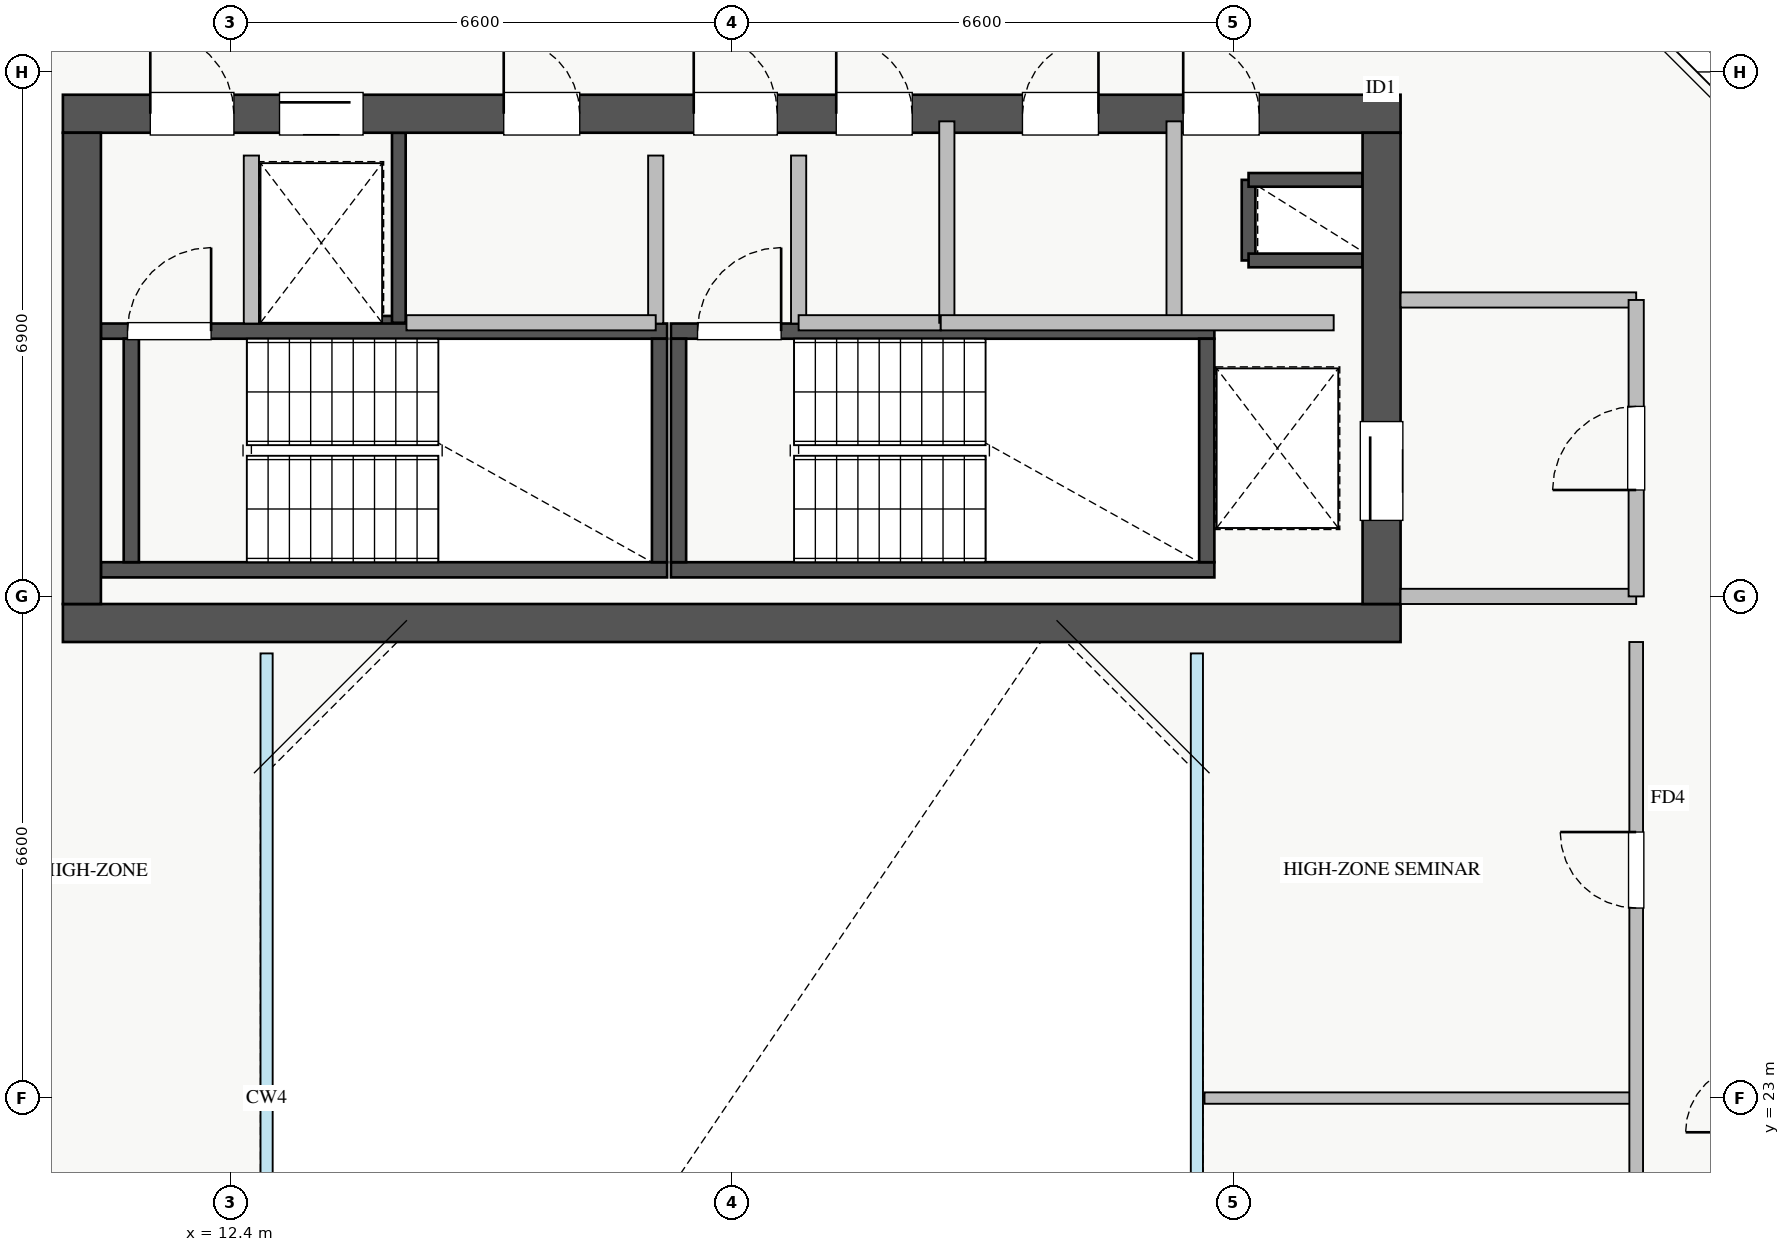
"""IFC4 building model, lengths in metres.
Left out: names, types, materials, properties, quantities, classifications, styles, units other than length and angle.
Written with IfcOpenShell. Run it as: python <this file> out.ifc"""

import sys

from ifc_helpers import new_model, si_unit, direction, frame, frame_2d, origin, place, context, subcontext, project, spatial, rectangle, extrude, source, transform, mapped, element, fill, save


model = new_model("IFC4")
c1 = context("Model", 3, precision=1e-05, world=origin(), true_north=direction((0.0, 1.0)))
c2 = subcontext(c1, "Body", "Model", "MODEL_VIEW")
j1 = project(units=[si_unit("LENGTHUNIT", "METRE"), si_unit("PLANEANGLEUNIT", "RADIAN")], contexts=[c1])
p1 = place(None, origin())
s1 = spatial("IfcSite", under=j1, at=p1, CompositionType="ELEMENT")
p2 = place(p1, origin())
s2 = spatial("IfcBuilding", under=s1, at=p2, CompositionType="ELEMENT")
p3 = place(p2, frame((0.0, 0.0, 226.25)))
s3 = spatial("IfcBuildingStorey", under=s2, at=p3, CompositionType="ELEMENT", Elevation=226.25)
p4 = place(p3, frame((12.68, 33.2, 0.0), z_axis=(0.0, 0.0, 1.0), x_axis=(1.0, 0.0, 0.0)))
e1 = element("IfcWall", 1, at=p4, inside=s3, PredefinedType="SHEAR", context=c2, shape_type="SweptSolid", body=[
    extrude(rectangle(XDim=1.94, YDim=0.18, at=frame_2d((0.97, 0.0))), origin(), (0.0, 0.0, 1.0), 3.07),
])
p5 = place(p3, frame((14.62, 33.2, 0.0), z_axis=(0.0, 0.0, 1.0), x_axis=(0.0, 1.0, 0.0)))
e2 = element("IfcWall", 2, at=p5, inside=s3, PredefinedType="SHEAR", context=c2, shape_type="SweptSolid", body=[
    extrude(rectangle(XDim=2.5, YDim=0.18, at=frame_2d((1.25, 0.0))), origin(), (0.0, 0.0, 1.0), 3.07),
])
p6 = place(p3, frame((25.8, 34.02, 0.0), z_axis=(0.0, 0.0, 1.0), x_axis=(0.0, 1.0, 0.0)))
e3 = element("IfcWall", 3, at=p6, inside=s3, PredefinedType="SHEAR", context=c2, shape_type="SweptSolid", body=[
    extrude(rectangle(XDim=1.06, YDim=0.18, at=frame_2d((0.53, 0.0))), origin(), (0.0, 0.0, 1.0), 3.07),
])
for number, where, z_axis, x_axis in (
    (4, (25.8, 35.08, 0.0), (0.0, 0.0, 1.0), (1.0, 0.0, 0.0)),
    (5, (25.8, 34.02, 0.0), (0.0, 0.0, 1.0), (1.0, 0.0, 0.0)),
):
    element("IfcWall", number, at=place(p3, frame(where, z_axis=z_axis, x_axis=x_axis)), inside=s3, PredefinedType="SHEAR", context=c2, shape_type="SweptSolid", body=[
        extrude(rectangle(XDim=1.5, YDim=0.18, at=frame_2d((0.75, 0.0))), origin(), (0.0, 0.0, 1.0), 3.07),
    ])
p7 = place(p3, frame((10.7, 29.95, 0.0), z_axis=(0.0, 0.0, 1.0), x_axis=(1.0, 0.0, 0.0)))
e6 = element("IfcWall", 6, at=p7, inside=s3, PredefinedType="SHEAR", context=c2, shape_type="SweptSolid", body=[
    extrude(rectangle(XDim=7.45, YDim=0.2, at=frame_2d((3.725, 0.0))), origin(), (0.0, 0.0, 1.0), 3.25),
])
p8 = place(p3, frame((10.7, 33.09, 0.0), z_axis=(0.0, 0.0, 1.0), x_axis=(1.0, 0.0, 0.0)))
e7 = element("IfcWall", 7, at=p8, inside=s3, PredefinedType="SHEAR", context=c2, shape_type="SweptSolid", body=[
    extrude(rectangle(XDim=7.45, YDim=0.2, at=frame_2d((3.725, 0.0))), origin(), (0.0, 0.0, 1.0), 3.25),
])
p9 = place(p8, frame((0.35, 0.0, 0.0)))
e8 = element("IfcOpeningElement", 8, at=p9, cuts=e7, PredefinedType="OPENING", context=c2, shape_type="SweptSolid", body=[
    extrude(rectangle(XDim=1.1, YDim=2.05, at=frame_2d((0.55, 1.025))), frame((0.0, 0.11, 0.0), z_axis=(0.0, -1.0, 0.0), x_axis=(1.0, 0.0, 0.0)), (0.0, 0.0, 1.0), 0.22),
])
for number, where, z_axis, x_axis in (
    (9, (11.1, 30.05, 0.0), (0.0, 0.0, 1.0), (0.0, 1.0, 0.0)),
    (10, (18.05, 30.05, 0.0), (0.0, 0.0, 1.0), (0.0, 1.0, 0.0)),
):
    element("IfcWall", number, at=place(p3, frame(where, z_axis=z_axis, x_axis=x_axis)), inside=s3, PredefinedType="SHEAR", context=c2, shape_type="SweptSolid", body=[
        extrude(rectangle(XDim=2.94, YDim=0.2, at=frame_2d((1.47, 0.0))), origin(), (0.0, 0.0, 1.0), 3.25),
    ])
p10 = place(p3, frame((18.2, 29.95, 0.0), z_axis=(0.0, 0.0, 1.0), x_axis=(1.0, 0.0, 0.0)))
e11 = element("IfcWall", 11, at=p10, inside=s3, PredefinedType="SHEAR", context=c2, shape_type="SweptSolid", body=[
    extrude(rectangle(XDim=7.15, YDim=0.2, at=frame_2d((3.575, 0.0))), origin(), (0.0, 0.0, 1.0), 3.25),
])
p11 = place(p3, frame((18.2, 33.09, 0.0), z_axis=(0.0, 0.0, 1.0), x_axis=(1.0, 0.0, 0.0)))
e12 = element("IfcWall", 12, at=p11, inside=s3, PredefinedType="SHEAR", context=c2, shape_type="SweptSolid", body=[
    extrude(rectangle(XDim=7.15, YDim=0.2, at=frame_2d((3.575, 0.0))), origin(), (0.0, 0.0, 1.0), 3.25),
])
p12 = place(p11, frame((0.35, 0.0, 0.0)))
e13 = element("IfcOpeningElement", 13, at=p12, cuts=e12, PredefinedType="OPENING", context=c2, shape_type="SweptSolid", body=[
    extrude(rectangle(XDim=1.1, YDim=2.05, at=frame_2d((0.55, 1.025))), frame((0.0, 0.11, 0.0), z_axis=(0.0, -1.0, 0.0), x_axis=(1.0, 0.0, 0.0)), (0.0, 0.0, 1.0), 0.22),
])
for number, where, z_axis, x_axis in (
    (14, (18.3, 30.05, 0.0), (0.0, 0.0, 1.0), (0.0, 1.0, 0.0)),
    (15, (25.25, 30.05, 0.0), (0.0, 0.0, 1.0), (0.0, 1.0, 0.0)),
):
    element("IfcWall", number, at=place(p3, frame(where, z_axis=z_axis, x_axis=x_axis)), inside=s3, PredefinedType="SHEAR", context=c2, shape_type="SweptSolid", body=[
        extrude(rectangle(XDim=2.94, YDim=0.2, at=frame_2d((1.47, 0.0))), origin(), (0.0, 0.0, 1.0), 3.25),
    ])
p13 = place(p3, frame((10.2, 29.25, 0.0), z_axis=(0.0, 0.0, 1.0), x_axis=(1.0, 0.0, 0.0)))
e16 = element("IfcWall", 16, at=p13, inside=s3, PredefinedType="SHEAR", context=c2, shape_type="SweptSolid", body=[
    extrude(rectangle(XDim=17.6, YDim=0.5, at=frame_2d((8.8, 0.0))), origin(), (0.0, 0.0, 1.0), 3.25),
])
p14 = place(p3, frame((10.2, 35.95, 0.0), z_axis=(0.0, 0.0, 1.0), x_axis=(1.0, 0.0, 0.0)))
e17 = element("IfcWall", 17, at=p14, inside=s3, PredefinedType="SHEAR", context=c2, shape_type="SweptSolid", body=[
    extrude(rectangle(XDim=17.6, YDim=0.5, at=frame_2d((8.8, 0.0))), origin(), (0.0, 0.0, 1.0), 3.25),
])
p15 = place(p14, frame((1.15, 0.0, 0.0)))
e18 = element("IfcOpeningElement", 18, at=p15, cuts=e17, PredefinedType="OPENING", context=c2, shape_type="SweptSolid", body=[
    extrude(rectangle(XDim=1.1, YDim=2.05, at=frame_2d((0.55, 1.025))), frame((0.0, 0.26, 0.0), z_axis=(0.0, -1.0, 0.0), x_axis=(1.0, 0.0, 0.0)), (0.0, 0.0, 1.0), 0.52),
])
p16 = place(p14, frame((8.3, 0.0, 0.0)))
e19 = element("IfcOpeningElement", 19, at=p16, cuts=e17, PredefinedType="OPENING", context=c2, shape_type="SweptSolid", body=[
    extrude(rectangle(XDim=1.1, YDim=2.05, at=frame_2d((0.55, 1.025))), frame((0.0, 0.26, 0.0), z_axis=(0.0, -1.0, 0.0), x_axis=(1.0, 0.0, 0.0)), (0.0, 0.0, 1.0), 0.52),
])
p17 = place(p14, frame((2.85, 0.0, 0.0)))
e20 = element("IfcOpeningElement", 20, at=p17, cuts=e17, PredefinedType="OPENING", context=c2, shape_type="SweptSolid", body=[
    extrude(rectangle(XDim=1.1, YDim=2.05, at=frame_2d((0.55, 1.025))), frame((0.0, 0.26, 0.0), z_axis=(0.0, -1.0, 0.0), x_axis=(1.0, 0.0, 0.0)), (0.0, 0.0, 1.0), 0.52),
])
p18 = place(p14, frame((5.8, 0.0, 0.0)))
e21 = element("IfcOpeningElement", 21, at=p18, cuts=e17, PredefinedType="OPENING", context=c2, shape_type="SweptSolid", body=[
    extrude(rectangle(XDim=1.0, YDim=2.05, at=frame_2d((0.5, 1.025))), frame((0.0, 0.26, 0.0), z_axis=(0.0, -1.0, 0.0), x_axis=(1.0, 0.0, 0.0)), (0.0, 0.0, 1.0), 0.52),
])
p19 = place(p14, frame((14.74, 0.0, 0.0)))
e22 = element("IfcOpeningElement", 22, at=p19, cuts=e17, PredefinedType="OPENING", context=c2, shape_type="SweptSolid", body=[
    extrude(rectangle(XDim=1.0, YDim=2.05, at=frame_2d((0.5, 1.025))), frame((0.0, 0.26, 0.0), z_axis=(0.0, -1.0, 0.0), x_axis=(1.0, 0.0, 0.0)), (0.0, 0.0, 1.0), 0.52),
])
p20 = place(p14, frame((10.175, 0.0, 0.0)))
e23 = element("IfcOpeningElement", 23, at=p20, cuts=e17, PredefinedType="OPENING", context=c2, shape_type="SweptSolid", body=[
    extrude(rectangle(XDim=1.0, YDim=2.05, at=frame_2d((0.5, 1.025))), frame((0.0, 0.26, 0.0), z_axis=(0.0, -1.0, 0.0), x_axis=(1.0, 0.0, 0.0)), (0.0, 0.0, 1.0), 0.52),
])
p21 = place(p14, frame((12.625, 0.0, 0.0)))
e24 = element("IfcOpeningElement", 24, at=p21, cuts=e17, PredefinedType="OPENING", context=c2, shape_type="SweptSolid", body=[
    extrude(rectangle(XDim=1.0, YDim=2.05, at=frame_2d((0.5, 1.025))), frame((0.0, 0.26, 0.0), z_axis=(0.0, -1.0, 0.0), x_axis=(1.0, 0.0, 0.0)), (0.0, 0.0, 1.0), 0.52),
])
p22 = place(p3, frame((10.45, 29.5, 0.0), z_axis=(0.0, 0.0, 1.0), x_axis=(0.0, 1.0, 0.0)))
e25 = element("IfcWall", 25, at=p22, inside=s3, PredefinedType="SHEAR", context=c2, shape_type="SweptSolid", body=[
    extrude(rectangle(XDim=6.2, YDim=0.5, at=frame_2d((3.1, 0.0))), origin(), (0.0, 0.0, 1.0), 3.25),
])
p23 = place(p3, frame((27.55, 29.5, 0.0), z_axis=(0.0, 0.0, 1.0), x_axis=(0.0, 1.0, 0.0)))
e26 = element("IfcWall", 26, at=p23, inside=s3, PredefinedType="SHEAR", context=c2, shape_type="SweptSolid", body=[
    extrude(rectangle(XDim=6.2, YDim=0.5, at=frame_2d((3.1, 0.0))), origin(), (0.0, 0.0, 1.0), 3.25),
])
p24 = place(p23, frame((1.1, 0.0, 0.0)))
e27 = element("IfcOpeningElement", 27, at=p24, cuts=e26, PredefinedType="OPENING", context=c2, shape_type="SweptSolid", body=[
    extrude(rectangle(XDim=1.3, YDim=2.05, at=frame_2d((0.65, 1.025))), frame((0.0, 0.26, 0.0), z_axis=(0.0, -1.0, 0.0), x_axis=(1.0, 0.0, 0.0)), (0.0, 0.0, 1.0), 0.52),
])
p25 = place(p3, frame((27.8, 29.6, 0.0), z_axis=(0.0, 0.0, 1.0), x_axis=(1.0, 0.0, 0.0)))
e28 = element("IfcWall", 28, at=p25, inside=s3, PredefinedType="PARTITIONING", context=c2, shape_type="SweptSolid", body=[
    extrude(rectangle(XDim=3.1, YDim=0.2, at=frame_2d((1.55, 0.0))), origin(), (0.0, 0.0, 1.0), 3.07),
])
p26 = place(p3, frame((27.8, 33.5, 0.0), z_axis=(0.0, 0.0, 1.0), x_axis=(1.0, 0.0, 0.0)))
e29 = element("IfcWall", 29, at=p26, inside=s3, PredefinedType="PARTITIONING", context=c2, shape_type="SweptSolid", body=[
    extrude(rectangle(XDim=3.1, YDim=0.2, at=frame_2d((1.55, 0.0))), origin(), (0.0, 0.0, 1.0), 2.265),
])
p27 = place(p3, frame((30.9, 29.6, 0.0), z_axis=(0.0, 0.0, 1.0), x_axis=(0.0, 1.0, 0.0)))
e30 = element("IfcWall", 30, at=p27, inside=s3, PredefinedType="PARTITIONING", context=c2, shape_type="SweptSolid", body=[
    extrude(rectangle(XDim=3.9, YDim=0.2, at=frame_2d((1.95, 0.0))), origin(), (0.0, 0.0, 1.0), 3.07),
])
p28 = place(p27, frame((1.4, 0.0, 0.0)))
e31 = element("IfcOpeningElement", 31, at=p28, cuts=e30, PredefinedType="OPENING", context=c2, shape_type="SweptSolid", body=[
    extrude(rectangle(XDim=1.1, YDim=2.05, at=frame_2d((0.55, 1.025))), frame((0.0, 0.11, 0.0), z_axis=(0.0, -1.0, 0.0), x_axis=(1.0, 0.0, 0.0)), (0.0, 0.0, 1.0), 0.22),
])
for number, where, z_axis, x_axis in (
    (32, (12.68, 33.19, 0.0), (0.0, 0.0, 1.0), (0.0, 1.0, 0.0)),
    (33, (18.0, 33.19, 0.0), (0.0, 0.0, 1.0), (0.0, 1.0, 0.0)),
    (34, (19.88, 33.19, 0.0), (0.0, 0.0, 1.0), (0.0, 1.0, 0.0)),
):
    element("IfcWall", number, at=place(p3, frame(where, z_axis=z_axis, x_axis=x_axis)), inside=s3, PredefinedType="PARTITIONING", context=c2, shape_type="SweptSolid", body=[
        extrude(rectangle(XDim=2.21, YDim=0.2, at=frame_2d((1.105, 0.0))), origin(), (0.0, 0.0, 1.0), 3.07),
    ])
p29 = place(p3, frame((14.72, 33.2, 0.0), z_axis=(0.0, 0.0, 1.0), x_axis=(1.0, 0.0, 0.0)))
e35 = element("IfcWall", 35, at=p29, inside=s3, PredefinedType="PARTITIONING", context=c2, shape_type="SweptSolid", body=[
    extrude(rectangle(XDim=3.28, YDim=0.2, at=frame_2d((1.64, 0.0))), origin(), (0.0, 0.0, 1.0), 3.07),
])
p30 = place(p3, frame((24.82, 33.2, 0.0), z_axis=(0.0, 0.0, 1.0), x_axis=(0.0, 1.0, 0.0)))
e36 = element("IfcWall", 36, at=p30, inside=s3, PredefinedType="PARTITIONING", context=c2, shape_type="SweptSolid", body=[
    extrude(rectangle(XDim=2.65, YDim=0.2, at=frame_2d((1.325, 0.0))), origin(), (0.0, 0.0, 1.0), 3.07),
])
p31 = place(p3, frame((19.88, 33.2, 0.0), z_axis=(0.0, 0.0, 1.0), x_axis=(1.0, 0.0, 0.0)))
e37 = element("IfcWall", 37, at=p31, inside=s3, PredefinedType="PARTITIONING", context=c2, shape_type="SweptSolid", body=[
    extrude(rectangle(XDim=1.87, YDim=0.2, at=frame_2d((0.935, 0.0))), origin(), (0.0, 0.0, 1.0), 3.07),
])
p32 = place(p3, frame((21.83, 33.2, 0.0), z_axis=(0.0, 0.0, 1.0), x_axis=(0.0, 1.0, 0.0)))
e38 = element("IfcWall", 38, at=p32, inside=s3, PredefinedType="PARTITIONING", context=c2, shape_type="SweptSolid", body=[
    extrude(rectangle(XDim=2.65, YDim=0.2, at=frame_2d((1.325, 0.0))), origin(), (0.0, 0.0, 1.0), 3.07),
])
p33 = place(p3, frame((21.75, 33.2, 0.0), z_axis=(0.0, 0.0, 1.0), x_axis=(1.0, 0.0, 0.0)))
e39 = element("IfcWall", 39, at=p33, inside=s3, PredefinedType="PARTITIONING", context=c2, shape_type="SweptSolid", body=[
    extrude(rectangle(XDim=5.17, YDim=0.2, at=frame_2d((2.585, 0.0))), origin(), (0.0, 0.0, 1.0), 3.07),
])
p34 = place(p3, frame((25.22, 23.0, 0.0), z_axis=(0.0, 0.0, 1.0), x_axis=(1.0, 0.0, 0.0)))
e40 = element("IfcWall", 40, at=p34, inside=s3, PredefinedType="PARTITIONING", context=c2, shape_type="SweptSolid", body=[
    extrude(rectangle(XDim=5.68, YDim=0.15, at=frame_2d((2.84, 0.0))), origin(), (0.0, 0.0, 1.0), 3.07),
])
p35 = place(p3, frame((30.9, 17.0, 0.0), z_axis=(0.0, 0.0, 1.0), x_axis=(0.0, 1.0, 0.0)))
e41 = element("IfcWall", 41, at=p35, inside=s3, PredefinedType="PARTITIONING", context=c2, shape_type="SweptSolid", body=[
    extrude(rectangle(XDim=12.0, YDim=0.18, at=frame_2d((6.0, 0.0))), origin(), (0.0, 0.0, 1.0), 3.07),
])
p36 = place(p35, frame((2.5, 0.0, 0.0)))
e42 = element("IfcOpeningElement", 42, at=p36, cuts=e41, PredefinedType="OPENING", context=c2, shape_type="SweptSolid", body=[
    extrude(rectangle(XDim=1.0, YDim=2.05, at=frame_2d((0.5, 1.025))), frame((0.0, 0.1, 0.0), z_axis=(0.0, -1.0, 0.0), x_axis=(1.0, 0.0, 0.0)), (0.0, 0.0, 1.0), 0.2),
])
p37 = place(p35, frame((8.5, 0.0, 0.0)))
e43 = element("IfcOpeningElement", 43, at=p37, cuts=e41, PredefinedType="OPENING", context=c2, shape_type="SweptSolid", body=[
    extrude(rectangle(XDim=1.0, YDim=2.05, at=frame_2d((0.5, 1.025))), frame((0.0, 0.1, 0.0), z_axis=(0.0, -1.0, 0.0), x_axis=(1.0, 0.0, 0.0)), (0.0, 0.0, 1.0), 0.2),
])
m1 = source(origin(), c2, "Body", "SweptSolid", [
    extrude(rectangle(XDim=1.3, YDim=2.05, at=frame_2d((0.65, 1.025))), frame((0.0, 0.025, 0.0), z_axis=(0.0, -1.0, 0.0), x_axis=(1.0, 0.0, 0.0)), (0.0, 0.0, 1.0), 0.05),
])
p38 = place(p24, origin())
e44 = element("IfcDoor", 44, at=p38, inside=s3, OperationType="SLIDING_TO_LEFT", PredefinedType="DOOR", context=c2, shape_type="MappedRepresentation", body=[
    mapped(m1, transform((0.0, 0.0, 0.0), x_axis=(1.0, 0.0, 0.0), y_axis=(0.0, 1.0, 0.0), z_axis=(0.0, 0.0, 1.0), scale=1.0)),
])
fill(e27, e44)
m2 = source(origin(), c2, "Body", "SweptSolid", [
    extrude(rectangle(XDim=1.1, YDim=2.05, at=frame_2d((0.55, 1.025))), frame((0.0, 0.025, 0.0), z_axis=(0.0, -1.0, 0.0), x_axis=(1.0, 0.0, 0.0)), (0.0, 0.0, 1.0), 0.05),
])
p39 = place(p15, origin())
e45 = element("IfcDoor", 45, at=p39, inside=s3, OperationType="SINGLE_SWING_LEFT", PredefinedType="DOOR", context=c2, shape_type="MappedRepresentation", body=[
    mapped(m2, transform((0.0, 0.0, 0.0), x_axis=(1.0, 0.0, 0.0), y_axis=(0.0, 1.0, 0.0), z_axis=(0.0, 0.0, 1.0), scale=1.0)),
])
fill(e18, e45)
p40 = place(p9, origin())
e46 = element("IfcDoor", 46, at=p40, inside=s3, OperationType="SINGLE_SWING_RIGHT", PredefinedType="DOOR", context=c2, shape_type="MappedRepresentation", body=[
    mapped(m2, transform((0.0, 0.0, 0.0), x_axis=(1.0, 0.0, 0.0), y_axis=(0.0, 1.0, 0.0), z_axis=(0.0, 0.0, 1.0), scale=1.0)),
])
fill(e8, e46)
p41 = place(p16, origin())
e47 = element("IfcDoor", 47, at=p41, inside=s3, OperationType="SINGLE_SWING_LEFT", PredefinedType="DOOR", context=c2, shape_type="MappedRepresentation", body=[
    mapped(m2, transform((0.0, 0.0, 0.0), x_axis=(1.0, 0.0, 0.0), y_axis=(0.0, 1.0, 0.0), z_axis=(0.0, 0.0, 1.0), scale=1.0)),
])
fill(e19, e47)
p42 = place(p12, origin())
e48 = element("IfcDoor", 48, at=p42, inside=s3, OperationType="SINGLE_SWING_RIGHT", PredefinedType="DOOR", context=c2, shape_type="MappedRepresentation", body=[
    mapped(m2, transform((0.0, 0.0, 0.0), x_axis=(1.0, 0.0, 0.0), y_axis=(0.0, 1.0, 0.0), z_axis=(0.0, 0.0, 1.0), scale=1.0)),
])
fill(e13, e48)
p43 = place(p17, origin())
e49 = element("IfcDoor", 49, at=p43, inside=s3, OperationType="SLIDING_TO_LEFT", PredefinedType="DOOR", context=c2, shape_type="MappedRepresentation", body=[
    mapped(m2, transform((0.0, 0.0, 0.0), x_axis=(1.0, 0.0, 0.0), y_axis=(0.0, 1.0, 0.0), z_axis=(0.0, 0.0, 1.0), scale=1.0)),
])
fill(e20, e49)
m3 = source(origin(), c2, "Body", "SweptSolid", [
    extrude(rectangle(XDim=1.0, YDim=2.05, at=frame_2d((0.5, 1.025))), frame((0.0, 0.025, 0.0), z_axis=(0.0, -1.0, 0.0), x_axis=(1.0, 0.0, 0.0)), (0.0, 0.0, 1.0), 0.05),
])
p44 = place(p18, origin())
e50 = element("IfcDoor", 50, at=p44, inside=s3, OperationType="SINGLE_SWING_LEFT", PredefinedType="DOOR", context=c2, shape_type="MappedRepresentation", body=[
    mapped(m3, transform((0.0, 0.0, 0.0), x_axis=(1.0, 0.0, 0.0), y_axis=(0.0, 1.0, 0.0), z_axis=(0.0, 0.0, 1.0), scale=1.0)),
])
fill(e21, e50)
p45 = place(p19, origin())
e51 = element("IfcDoor", 51, at=p45, inside=s3, OperationType="SINGLE_SWING_LEFT", PredefinedType="DOOR", context=c2, shape_type="MappedRepresentation", body=[
    mapped(m3, transform((0.0, 0.0, 0.0), x_axis=(1.0, 0.0, 0.0), y_axis=(0.0, 1.0, 0.0), z_axis=(0.0, 0.0, 1.0), scale=1.0)),
])
fill(e22, e51)
p46 = place(p20, origin())
e52 = element("IfcDoor", 52, at=p46, inside=s3, OperationType="SINGLE_SWING_LEFT", PredefinedType="DOOR", context=c2, shape_type="MappedRepresentation", body=[
    mapped(m3, transform((0.0, 0.0, 0.0), x_axis=(1.0, 0.0, 0.0), y_axis=(0.0, 1.0, 0.0), z_axis=(0.0, 0.0, 1.0), scale=1.0)),
])
fill(e23, e52)
p47 = place(p21, origin())
e53 = element("IfcDoor", 53, at=p47, inside=s3, OperationType="SINGLE_SWING_RIGHT", PredefinedType="DOOR", context=c2, shape_type="MappedRepresentation", body=[
    mapped(m3, transform((0.0, 0.0, 0.0), x_axis=(1.0, 0.0, 0.0), y_axis=(0.0, 1.0, 0.0), z_axis=(0.0, 0.0, 1.0), scale=1.0)),
])
fill(e24, e53)
p48 = place(p28, origin())
e54 = element("IfcDoor", 54, at=p48, inside=s3, OperationType="SINGLE_SWING_LEFT", PredefinedType="DOOR", context=c2, shape_type="MappedRepresentation", body=[
    mapped(m2, transform((0.0, 0.0, 0.0), x_axis=(1.0, 0.0, 0.0), y_axis=(0.0, 1.0, 0.0), z_axis=(0.0, 0.0, 1.0), scale=1.0)),
])
fill(e31, e54)
p49 = place(p37, origin())
e55 = element("IfcDoor", 55, at=p49, inside=s3, OperationType="SINGLE_SWING_RIGHT", PredefinedType="DOOR", context=c2, shape_type="MappedRepresentation", body=[
    mapped(m3, transform((0.0, 0.0, 0.0), x_axis=(1.0, 0.0, 0.0), y_axis=(0.0, 1.0, 0.0), z_axis=(0.0, 0.0, 1.0), scale=1.0)),
])
fill(e43, e55)
save(model, sys.argv[1])
